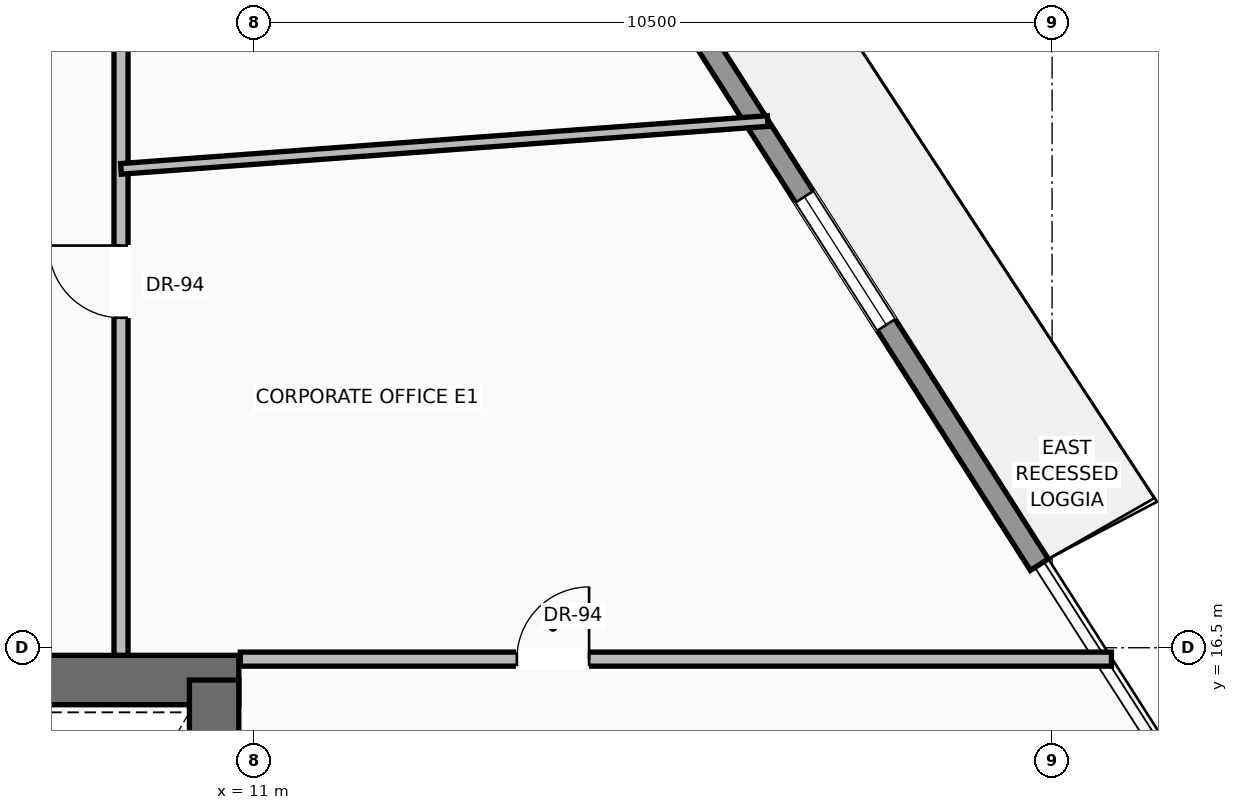
"""IFC4 building model, lengths in metres.
Left out: names, types, materials, properties, quantities, classifications, styles, units other than length and angle.
Written with IfcOpenShell. Run it as: python <this file> out.ifc"""

import sys

from ifc_helpers import new_model, si_unit, direction, frame, frame_2d, origin, place, context, subcontext, project, spatial, rectangle, extrude, source, transform, mapped, element, fill, save


model = new_model("IFC4")
c1 = context("Model", 3, precision=1e-05, world=origin(), true_north=direction((0.0, 1.0)))
c2 = subcontext(c1, "Body", "Model", "MODEL_VIEW")
j1 = project(units=[si_unit("LENGTHUNIT", "METRE"), si_unit("PLANEANGLEUNIT", "RADIAN")], contexts=[c1])
p1 = place(None, origin())
s1 = spatial("IfcSite", under=j1, at=p1, CompositionType="ELEMENT")
p2 = place(p1, origin())
s2 = spatial("IfcBuilding", under=s1, at=p2, CompositionType="ELEMENT")
p3 = place(p2, frame((0.0, 0.0, 129.3)))
s3 = spatial("IfcBuildingStorey", under=s2, at=p3, CompositionType="ELEMENT", Elevation=129.3)
p4 = place(p3, frame((-10.8, 16.075, 0.0), z_axis=(0.0, 0.0, 1.0), x_axis=(1.0, 0.0, 0.0)))
e1 = element("IfcWall", 1, at=p4, inside=s3, PredefinedType="SHEAR", context=c2, shape_type="SweptSolid", body=[
    extrude(rectangle(XDim=21.6, YDim=0.65, at=frame_2d((10.8, 0.0))), origin(), (0.0, 0.0, 1.0), 3.47),
])
p5 = place(p4, frame((3.37, 0.0, 0.0)))
e2 = element("IfcOpeningElement", 2, at=p5, cuts=e1, PredefinedType="OPENING", context=c2, shape_type="SweptSolid", body=[
    extrude(rectangle(XDim=1.3, YDim=2.3, at=frame_2d((0.65, 1.15))), frame((0.0, 0.335, 0.0), z_axis=(0.0, -1.0, 0.0), x_axis=(1.0, 0.0, 0.0)), (0.0, 0.0, 1.0), 0.67),
])
p6 = place(p4, frame((9.8, 0.0, 0.0)))
e3 = element("IfcOpeningElement", 3, at=p6, cuts=e1, PredefinedType="OPENING", context=c2, shape_type="SweptSolid", body=[
    extrude(rectangle(XDim=2.0, YDim=2.4, at=frame_2d((1.0, 1.2))), frame((0.0, 0.335, 0.0), z_axis=(0.0, -1.0, 0.0), x_axis=(1.0, 0.0, 0.0)), (0.0, 0.0, 1.0), 0.67),
])
p7 = place(p3, frame((10.475, 0.525, 0.0), z_axis=(0.0, 0.0, 1.0), x_axis=(0.0, 1.0, 0.0)))
e4 = element("IfcWall", 4, at=p7, inside=s3, PredefinedType="SHEAR", context=c2, shape_type="SweptSolid", body=[
    extrude(rectangle(XDim=15.55, YDim=0.65, at=frame_2d((7.775, 0.0))), origin(), (0.0, 0.0, 1.0), 3.47),
])
p8 = place(p3, frame((11.673, 32.717, 0.0), z_axis=(0.0, 0.0, 1.0), x_axis=(0.538267430492, -0.842774093854, 0.0)))
e5 = element("IfcWall", 5, at=p8, inside=s3, PredefinedType="SOLIDWALL", context=c2, shape_type="SweptSolid", body=[
    extrude(rectangle(XDim=17.945, YDim=0.28, at=frame_2d((8.972, 0.0))), origin(), (0.0, 0.0, 1.0), 3.05),
])
p9 = place(p8, frame((4.307, 0.0, 0.0)))
e6 = element("IfcOpeningElement", 6, at=p9, cuts=e5, PredefinedType="OPENING", context=c2, shape_type="SweptSolid", body=[
    extrude(rectangle(XDim=1.6, YDim=2.35, at=frame_2d((0.8, 1.175))), frame((0.0, 0.15, 0.0), z_axis=(0.0, -1.0, 0.0), x_axis=(1.0, 0.0, 0.0)), (0.0, 0.0, 1.0), 0.3),
])
p10 = place(p8, frame((12.202, 0.0, 0.9)))
e7 = element("IfcOpeningElement", 7, at=p10, cuts=e5, PredefinedType="OPENING", context=c2, shape_type="SweptSolid", body=[
    extrude(rectangle(XDim=2.0, YDim=1.85, at=frame_2d((1.0, 0.925))), frame((0.0, 0.15, 0.0), z_axis=(0.0, -1.0, 0.0), x_axis=(1.0, 0.0, 0.0)), (0.0, 0.0, 1.0), 0.3),
])
p11 = place(p3, frame((9.25, 16.4, 0.0), z_axis=(0.0, 0.0, 1.0), x_axis=(0.0, 1.0, 0.0)))
e8 = element("IfcWall", 8, at=p11, inside=s3, PredefinedType="PARTITIONING", context=c2, shape_type="SweptSolid", body=[
    extrude(rectangle(XDim=9.0, YDim=0.185, at=frame_2d((4.5, 0.0))), origin(), (0.0, 0.0, 1.0), 2.846),
])
p12 = place(p11, frame((4.441, 0.0, 0.0)))
e9 = element("IfcOpeningElement", 9, at=p12, cuts=e8, PredefinedType="OPENING", context=c2, shape_type="SweptSolid", body=[
    extrude(rectangle(XDim=0.95, YDim=2.2, at=frame_2d((0.475, 1.1))), frame((0.0, 0.103, 0.0), z_axis=(0.0, -1.0, 0.0), x_axis=(1.0, 0.0, 0.0)), (0.0, 0.0, 1.0), 0.205),
])
p13 = place(p3, frame((10.82, 16.35, 0.0), z_axis=(0.0, 0.0, 1.0), x_axis=(1.0, 0.0, 0.0)))
e10 = element("IfcWall", 10, at=p13, inside=s3, PredefinedType="PARTITIONING", context=c2, shape_type="SweptSolid", body=[
    extrude(rectangle(XDim=11.461, YDim=0.185, at=frame_2d((5.73, 0.0))), origin(), (0.0, 0.0, 1.0), 3.462),
])
p14 = place(p13, frame((3.638, 0.0, 0.0)))
e11 = element("IfcOpeningElement", 11, at=p14, cuts=e10, PredefinedType="OPENING", context=c2, shape_type="SweptSolid", body=[
    extrude(rectangle(XDim=0.95, YDim=2.2, at=frame_2d((0.475, 1.1))), frame((0.0, 0.103, 0.0), z_axis=(0.0, -1.0, 0.0), x_axis=(1.0, 0.0, 0.0)), (0.0, 0.0, 1.0), 0.205),
])
p15 = place(p3, frame((9.25, 22.8, 0.0), z_axis=(0.0, 0.0, 1.0), x_axis=(0.997273450808, 0.073794744488, 0.0)))
e12 = element("IfcWall", 12, at=p15, inside=s3, PredefinedType="PARTITIONING", context=c2, shape_type="SweptSolid", body=[
    extrude(rectangle(XDim=8.532, YDim=0.14, at=frame_2d((4.266, 0.0))), origin(), (0.0, 0.0, 1.0), 3.462),
])
m1 = source(origin(), c2, "Body", "SweptSolid", [
    extrude(rectangle(XDim=2.0, YDim=1.85, at=frame_2d((1.0, 0.925))), frame((0.0, 0.03, 0.0), z_axis=(0.0, -1.0, 0.0), x_axis=(1.0, 0.0, 0.0)), (0.0, 0.0, 1.0), 0.06),
])
p16 = place(p10, origin())
e13 = element("IfcWindow", 13, at=p16, inside=s3, PartitioningType="SINGLE_PANEL", PredefinedType="WINDOW", context=c2, shape_type="MappedRepresentation", body=[
    mapped(m1, transform((0.0, 0.0, 0.0), scale=1.0)),
])
fill(e7, e13)
m2 = source(origin(), c2, "Body", "SweptSolid", [
    extrude(rectangle(XDim=0.95, YDim=2.2, at=frame_2d((0.475, 1.1))), frame((0.0, 0.025, 0.0), z_axis=(0.0, -1.0, 0.0), x_axis=(1.0, 0.0, 0.0)), (0.0, 0.0, 1.0), 0.05),
])
p17 = place(p12, origin())
e14 = element("IfcDoor", 14, at=p17, inside=s3, OperationType="SINGLE_SWING_RIGHT", PredefinedType="DOOR", context=c2, shape_type="MappedRepresentation", body=[
    mapped(m2, transform((0.0, 0.0, 0.0), scale=1.0)),
])
fill(e9, e14)
p18 = place(p14, origin())
e15 = element("IfcDoor", 15, at=p18, inside=s3, OperationType="SINGLE_SWING_RIGHT", PredefinedType="DOOR", context=c2, shape_type="MappedRepresentation", body=[
    mapped(m2, transform((0.0, 0.0, 0.0), scale=1.0)),
])
fill(e11, e15)
save(model, sys.argv[1])
